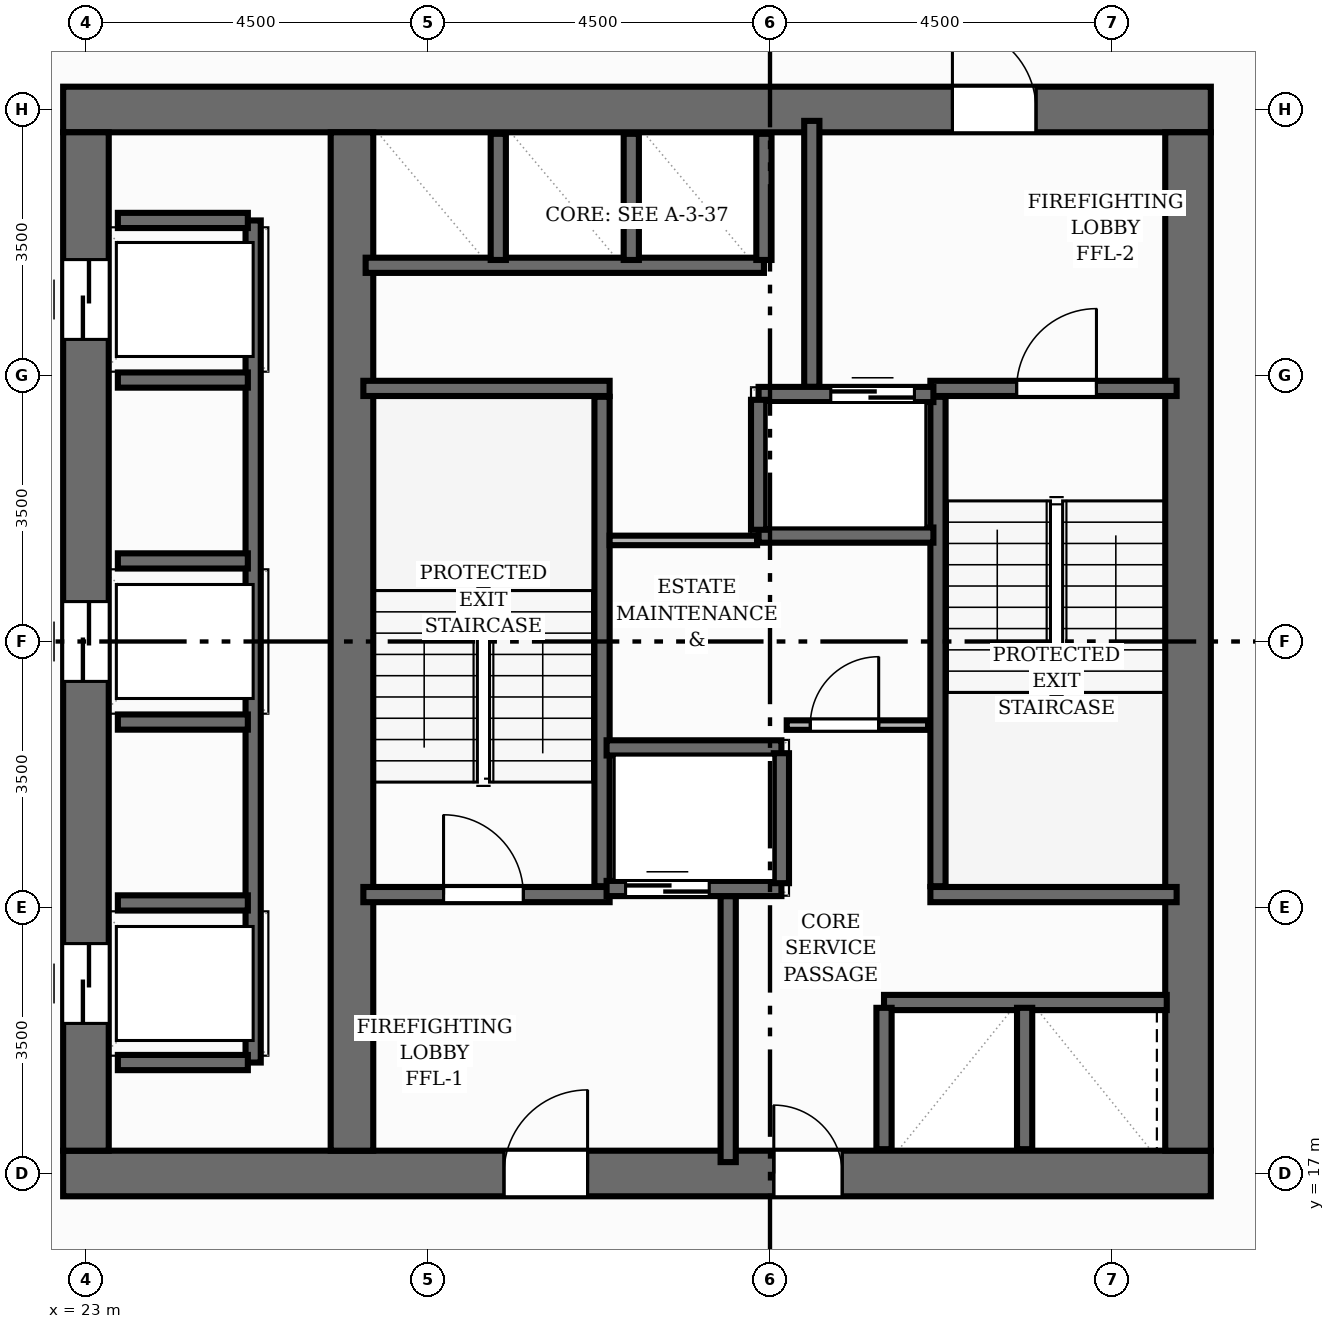
"""IFC4 building model, lengths in metres.
Left out: names, types, materials, properties, quantities, classifications, styles, units other than length and angle.
Written with IfcOpenShell. Run it as: python <this file> out.ifc"""

import sys

from ifc_helpers import new_model, si_unit, direction, frame, frame_2d, origin, place, context, subcontext, project, spatial, rectangle, extrude, element, fill, save


model = new_model("IFC4")
c1 = context("Model", 3, precision=1e-05, world=origin(), true_north=direction((0.0, 1.0)))
c2 = subcontext(c1, "Body", "Model", "MODEL_VIEW")
j1 = project(units=[si_unit("LENGTHUNIT", "METRE"), si_unit("PLANEANGLEUNIT", "RADIAN")], contexts=[c1])
p1 = place(None, origin())
s1 = spatial("IfcSite", under=j1, at=p1, CompositionType="ELEMENT")
p2 = place(p1, origin())
s2 = spatial("IfcBuilding", under=s1, at=p2, CompositionType="ELEMENT")
p3 = place(p2, frame((0.0, 0.0, 152.16)))
s3 = spatial("IfcBuildingStorey", under=s2, at=p3, CompositionType="ELEMENT", Elevation=152.16)
p4 = place(p3, frame((22.7, 17.0, 0.0), z_axis=(0.0, 0.0, 1.0), x_axis=(1.0, 0.0, 0.0)))
e1 = element("IfcWall", 1, at=p4, inside=s3, PredefinedType="SHEAR", context=c2, shape_type="SweptSolid", body=[
    extrude(rectangle(XDim=15.1, YDim=0.6, at=frame_2d((7.55, 0.0))), origin(), (0.0, 0.0, 1.0), 3.2),
])
p5 = place(p4, frame((5.8, 0.0, 0.0)))
e2 = element("IfcOpeningElement", 2, at=p5, cuts=e1, PredefinedType="OPENING", context=c2, shape_type="SweptSolid", body=[
    extrude(rectangle(XDim=1.1, YDim=2.15, at=frame_2d((0.55, 1.075))), frame((0.0, 0.31, 0.0), z_axis=(0.0, -1.0, 0.0), x_axis=(1.0, 0.0, 0.0)), (0.0, 0.0, 1.0), 0.62),
])
p6 = place(p4, frame((9.35, 0.0, 0.0)))
e3 = element("IfcOpeningElement", 3, at=p6, cuts=e1, PredefinedType="OPENING", context=c2, shape_type="SweptSolid", body=[
    extrude(rectangle(XDim=0.9, YDim=2.1, at=frame_2d((0.45, 1.05))), frame((0.0, 0.31, 0.0), z_axis=(0.0, -1.0, 0.0), x_axis=(1.0, 0.0, 0.0)), (0.0, 0.0, 1.0), 0.62),
])
p7 = place(p3, frame((22.7, 31.0, 0.0), z_axis=(0.0, 0.0, 1.0), x_axis=(1.0, 0.0, 0.0)))
e4 = element("IfcWall", 4, at=p7, inside=s3, PredefinedType="SHEAR", context=c2, shape_type="SweptSolid", body=[
    extrude(rectangle(XDim=15.1, YDim=0.6, at=frame_2d((7.55, 0.0))), origin(), (0.0, 0.0, 1.0), 3.2),
])
p8 = place(p7, frame((11.7, 0.0, 0.0)))
e5 = element("IfcOpeningElement", 5, at=p8, cuts=e4, PredefinedType="OPENING", context=c2, shape_type="SweptSolid", body=[
    extrude(rectangle(XDim=1.1, YDim=2.15, at=frame_2d((0.55, 1.075))), frame((0.0, 0.31, 0.0), z_axis=(0.0, -1.0, 0.0), x_axis=(1.0, 0.0, 0.0)), (0.0, 0.0, 1.0), 0.62),
])
p9 = place(p3, frame((23.0, 17.3, 0.0), z_axis=(0.0, 0.0, 1.0), x_axis=(0.0, 1.0, 0.0)))
e6 = element("IfcWall", 6, at=p9, inside=s3, PredefinedType="SHEAR", context=c2, shape_type="SweptSolid", body=[
    extrude(rectangle(XDim=13.4, YDim=0.6, at=frame_2d((6.7, 0.0))), origin(), (0.0, 0.0, 1.0), 3.2),
])
p10 = place(p9, frame((1.675, 0.0, 0.0)))
e7 = element("IfcOpeningElement", 7, at=p10, cuts=e6, PredefinedType="OPENING", context=c2, shape_type="SweptSolid", body=[
    extrude(rectangle(XDim=1.05, YDim=2.15, at=frame_2d((0.525, 1.075))), frame((0.0, 0.31, 0.0), z_axis=(0.0, -1.0, 0.0), x_axis=(1.0, 0.0, 0.0)), (0.0, 0.0, 1.0), 0.62),
])
p11 = place(p9, frame((6.175, 0.0, 0.0)))
e8 = element("IfcOpeningElement", 8, at=p11, cuts=e6, PredefinedType="OPENING", context=c2, shape_type="SweptSolid", body=[
    extrude(rectangle(XDim=1.05, YDim=2.15, at=frame_2d((0.525, 1.075))), frame((0.0, 0.31, 0.0), z_axis=(0.0, -1.0, 0.0), x_axis=(1.0, 0.0, 0.0)), (0.0, 0.0, 1.0), 0.62),
])
p12 = place(p9, frame((10.675, 0.0, 0.0)))
e9 = element("IfcOpeningElement", 9, at=p12, cuts=e6, PredefinedType="OPENING", context=c2, shape_type="SweptSolid", body=[
    extrude(rectangle(XDim=1.05, YDim=2.15, at=frame_2d((0.525, 1.075))), frame((0.0, 0.31, 0.0), z_axis=(0.0, -1.0, 0.0), x_axis=(1.0, 0.0, 0.0)), (0.0, 0.0, 1.0), 0.62),
])
p13 = place(p3, frame((37.5, 17.3, 0.0), z_axis=(0.0, 0.0, 1.0), x_axis=(0.0, 1.0, 0.0)))
e10 = element("IfcWall", 10, at=p13, inside=s3, PredefinedType="SHEAR", context=c2, shape_type="SweptSolid", body=[
    extrude(rectangle(XDim=13.4, YDim=0.6, at=frame_2d((6.7, 0.0))), origin(), (0.0, 0.0, 1.0), 3.2),
])
p14 = place(p3, frame((26.5, 17.3, 0.0), z_axis=(0.0, 0.0, 1.0), x_axis=(0.0, 1.0, 0.0)))
e11 = element("IfcWall", 11, at=p14, inside=s3, PredefinedType="SHEAR", context=c2, shape_type="SweptSolid", body=[
    extrude(rectangle(XDim=13.4, YDim=0.56, at=frame_2d((6.7, 0.0))), origin(), (0.0, 0.0, 1.0), 3.2),
])
p15 = place(p3, frame((29.79, 20.78, 0.0), z_axis=(0.0, 0.0, 1.0), x_axis=(0.0, 1.0, 0.0)))
e12 = element("IfcWall", 12, at=p15, inside=s3, PredefinedType="SHEAR", context=c2, shape_type="SweptSolid", body=[
    extrude(rectangle(XDim=6.44, YDim=0.2, at=frame_2d((3.22, 0.0))), origin(), (0.0, 0.0, 1.0), 3.2),
])
p16 = place(p3, frame((26.65, 27.33, 0.0), z_axis=(0.0, 0.0, 1.0), x_axis=(1.0, 0.0, 0.0)))
e13 = element("IfcWall", 13, at=p16, inside=s3, PredefinedType="SHEAR", context=c2, shape_type="SweptSolid", body=[
    extrude(rectangle(XDim=3.24, YDim=0.2, at=frame_2d((1.62, 0.0))), origin(), (0.0, 0.0, 1.0), 3.2),
])
p17 = place(p3, frame((26.65, 20.67, 0.0), z_axis=(0.0, 0.0, 1.0), x_axis=(1.0, 0.0, 0.0)))
e14 = element("IfcWall", 14, at=p17, inside=s3, PredefinedType="SHEAR", context=c2, shape_type="SweptSolid", body=[
    extrude(rectangle(XDim=3.24, YDim=0.2, at=frame_2d((1.62, 0.0))), origin(), (0.0, 0.0, 1.0), 3.2),
])
p18 = place(p17, frame((1.055, 0.0, 0.0)))
e15 = element("IfcOpeningElement", 15, at=p18, cuts=e14, PredefinedType="OPENING", context=c2, shape_type="SweptSolid", body=[
    extrude(rectangle(XDim=1.05, YDim=2.15, at=frame_2d((0.525, 1.075))), frame((0.0, 0.11, 0.0), z_axis=(0.0, -1.0, 0.0), x_axis=(1.0, 0.0, 0.0)), (0.0, 0.0, 1.0), 0.22),
])
p19 = place(p3, frame((34.21, 20.78, 0.0), z_axis=(0.0, 0.0, 1.0), x_axis=(0.0, 1.0, 0.0)))
e16 = element("IfcWall", 16, at=p19, inside=s3, PredefinedType="SHEAR", context=c2, shape_type="SweptSolid", body=[
    extrude(rectangle(XDim=6.44, YDim=0.2, at=frame_2d((3.22, 0.0))), origin(), (0.0, 0.0, 1.0), 3.2),
])
p20 = place(p3, frame((34.11, 20.67, 0.0), z_axis=(0.0, 0.0, 1.0), x_axis=(1.0, 0.0, 0.0)))
e17 = element("IfcWall", 17, at=p20, inside=s3, PredefinedType="SHEAR", context=c2, shape_type="SweptSolid", body=[
    extrude(rectangle(XDim=3.24, YDim=0.2, at=frame_2d((1.62, 0.0))), origin(), (0.0, 0.0, 1.0), 3.2),
])
p21 = place(p3, frame((34.11, 27.33, 0.0), z_axis=(0.0, 0.0, 1.0), x_axis=(1.0, 0.0, 0.0)))
e18 = element("IfcWall", 18, at=p21, inside=s3, PredefinedType="SHEAR", context=c2, shape_type="SweptSolid", body=[
    extrude(rectangle(XDim=3.24, YDim=0.2, at=frame_2d((1.62, 0.0))), origin(), (0.0, 0.0, 1.0), 3.2),
])
p22 = place(p21, frame((1.135, 0.0, 0.0)))
e19 = element("IfcOpeningElement", 19, at=p22, cuts=e18, PredefinedType="OPENING", context=c2, shape_type="SweptSolid", body=[
    extrude(rectangle(XDim=1.05, YDim=2.15, at=frame_2d((0.525, 1.075))), frame((0.0, 0.11, 0.0), z_axis=(0.0, -1.0, 0.0), x_axis=(1.0, 0.0, 0.0)), (0.0, 0.0, 1.0), 0.22),
])
for number, where, z_axis, x_axis in (
    (20, (31.45, 17.15, 0.0), (0.0, 0.0, 1.0), (0.0, 1.0, 0.0)),
    (21, (32.55, 27.35, 0.0), (0.0, 0.0, 1.0), (0.0, 1.0, 0.0)),
):
    element("IfcWall", number, at=place(p3, frame(where, z_axis=z_axis, x_axis=x_axis)), inside=s3, PredefinedType="SHEAR", context=c2, shape_type="SweptSolid", body=[
        extrude(rectangle(XDim=3.5, YDim=0.2, at=frame_2d((1.75, 0.0))), origin(), (0.0, 0.0, 1.0), 3.2),
    ])
p23 = place(p3, frame((29.85, 20.75, 0.0), z_axis=(0.0, 0.0, 1.0), x_axis=(1.0, 0.0, 0.0)))
e22 = element("IfcWall", 22, at=p23, inside=s3, PredefinedType="SHEAR", context=c2, shape_type="SweptSolid", body=[
    extrude(rectangle(XDim=2.3, YDim=0.2, at=frame_2d((1.15, 0.0))), origin(), (0.0, 0.0, 1.0), 3.2),
])
p24 = place(p23, frame((0.25, 0.0, 0.0)))
e23 = element("IfcOpeningElement", 23, at=p24, cuts=e22, PredefinedType="OPENING", context=c2, shape_type="SweptSolid", body=[
    extrude(rectangle(XDim=1.1, YDim=2.15, at=frame_2d((0.55, 1.075))), frame((0.0, 0.11, 0.0), z_axis=(0.0, -1.0, 0.0), x_axis=(1.0, 0.0, 0.0)), (0.0, 0.0, 1.0), 0.22),
])
p25 = place(p3, frame((29.85, 22.6, 0.0), z_axis=(0.0, 0.0, 1.0), x_axis=(1.0, 0.0, 0.0)))
e24 = element("IfcWall", 24, at=p25, inside=s3, PredefinedType="SHEAR", context=c2, shape_type="SweptSolid", body=[
    extrude(rectangle(XDim=2.3, YDim=0.2, at=frame_2d((1.15, 0.0))), origin(), (0.0, 0.0, 1.0), 3.2),
])
p26 = place(p3, frame((32.15, 20.82, 0.0), z_axis=(0.0, 0.0, 1.0), x_axis=(0.0, 1.0, 0.0)))
e25 = element("IfcWall", 25, at=p26, inside=s3, PredefinedType="SHEAR", context=c2, shape_type="SweptSolid", body=[
    extrude(rectangle(XDim=1.71, YDim=0.2, at=frame_2d((0.855, 0.0))), origin(), (0.0, 0.0, 1.0), 3.2),
])
p27 = place(p3, frame((31.85, 27.25, 0.0), z_axis=(0.0, 0.0, 1.0), x_axis=(1.0, 0.0, 0.0)))
e26 = element("IfcWall", 26, at=p27, inside=s3, PredefinedType="SHEAR", context=c2, shape_type="SweptSolid", body=[
    extrude(rectangle(XDim=2.3, YDim=0.2, at=frame_2d((1.15, 0.0))), origin(), (0.0, 0.0, 1.0), 3.2),
])
p28 = place(p27, frame((0.95, 0.0, 0.0)))
e27 = element("IfcOpeningElement", 27, at=p28, cuts=e26, PredefinedType="OPENING", context=c2, shape_type="SweptSolid", body=[
    extrude(rectangle(XDim=1.1, YDim=2.15, at=frame_2d((0.55, 1.075))), frame((0.0, 0.11, 0.0), z_axis=(0.0, -1.0, 0.0), x_axis=(1.0, 0.0, 0.0)), (0.0, 0.0, 1.0), 0.22),
])
p29 = place(p3, frame((31.85, 25.4, 0.0), z_axis=(0.0, 0.0, 1.0), x_axis=(1.0, 0.0, 0.0)))
e28 = element("IfcWall", 28, at=p29, inside=s3, PredefinedType="SHEAR", context=c2, shape_type="SweptSolid", body=[
    extrude(rectangle(XDim=2.3, YDim=0.2, at=frame_2d((1.15, 0.0))), origin(), (0.0, 0.0, 1.0), 3.2),
])
p30 = place(p3, frame((31.85, 25.47, 0.0), z_axis=(0.0, 0.0, 1.0), x_axis=(0.0, 1.0, 0.0)))
e29 = element("IfcWall", 29, at=p30, inside=s3, PredefinedType="SHEAR", context=c2, shape_type="SweptSolid", body=[
    extrude(rectangle(XDim=1.71, YDim=0.2, at=frame_2d((0.855, 0.0))), origin(), (0.0, 0.0, 1.0), 3.2),
])
p31 = place(p3, frame((25.2, 18.46, 0.0), z_axis=(0.0, 0.0, 1.0), x_axis=(0.0, 1.0, 0.0)))
e30 = element("IfcWall", 30, at=p31, inside=s3, PredefinedType="SHEAR", context=c2, shape_type="SweptSolid", body=[
    extrude(rectangle(XDim=11.08, YDim=0.2, at=frame_2d((5.54, 0.0))), origin(), (0.0, 0.0, 1.0), 3.2),
])
for number, where, z_axis, x_axis in (
    (31, (23.42, 18.46, 0.0), (0.0, 0.0, 1.0), (1.0, 0.0, 0.0)),
    (32, (23.42, 29.54, 0.0), (0.0, 0.0, 1.0), (1.0, 0.0, 0.0)),
    (33, (23.42, 20.56, 0.0), (0.0, 0.0, 1.0), (1.0, 0.0, 0.0)),
    (34, (23.42, 22.94, 0.0), (0.0, 0.0, 1.0), (1.0, 0.0, 0.0)),
    (35, (23.42, 25.06, 0.0), (0.0, 0.0, 1.0), (1.0, 0.0, 0.0)),
    (36, (23.42, 27.44, 0.0), (0.0, 0.0, 1.0), (1.0, 0.0, 0.0)),
):
    element("IfcWall", number, at=place(p3, frame(where, z_axis=z_axis, x_axis=x_axis)), inside=s3, PredefinedType="SHEAR", context=c2, shape_type="SweptSolid", body=[
        extrude(rectangle(XDim=1.71, YDim=0.2, at=frame_2d((0.855, 0.0))), origin(), (0.0, 0.0, 1.0), 3.2),
    ])
p32 = place(p3, frame((26.68, 28.95, 0.0), z_axis=(0.0, 0.0, 1.0), x_axis=(1.0, 0.0, 0.0)))
e37 = element("IfcWall", 37, at=p32, inside=s3, PredefinedType="SHEAR", context=c2, shape_type="SweptSolid", body=[
    extrude(rectangle(XDim=5.24, YDim=0.2, at=frame_2d((2.62, 0.0))), origin(), (0.0, 0.0, 1.0), 3.2),
])
for number, where, z_axis, x_axis in (
    (38, (31.92, 29.02, 0.0), (0.0, 0.0, 1.0), (0.0, 1.0, 0.0)),
    (39, (28.425, 29.02, 0.0), (0.0, 0.0, 1.0), (0.0, 1.0, 0.0)),
    (40, (30.175, 29.02, 0.0), (0.0, 0.0, 1.0), (0.0, 1.0, 0.0)),
):
    element("IfcWall", number, at=place(p3, frame(where, z_axis=z_axis, x_axis=x_axis)), inside=s3, PredefinedType="SHEAR", context=c2, shape_type="SweptSolid", body=[
        extrude(rectangle(XDim=1.66, YDim=0.2, at=frame_2d((0.83, 0.0))), origin(), (0.0, 0.0, 1.0), 3.2),
    ])
p33 = place(p3, frame((33.5, 19.25, 0.0), z_axis=(0.0, 0.0, 1.0), x_axis=(1.0, 0.0, 0.0)))
e41 = element("IfcWall", 41, at=p33, inside=s3, PredefinedType="SHEAR", context=c2, shape_type="SweptSolid", body=[
    extrude(rectangle(XDim=3.72, YDim=0.2, at=frame_2d((1.86, 0.0))), origin(), (0.0, 0.0, 1.0), 3.2),
])
for number, where, z_axis, x_axis in (
    (42, (33.5, 17.32, 0.0), (0.0, 0.0, 1.0), (0.0, 1.0, 0.0)),
    (43, (35.35, 17.32, 0.0), (0.0, 0.0, 1.0), (0.0, 1.0, 0.0)),
):
    element("IfcWall", number, at=place(p3, frame(where, z_axis=z_axis, x_axis=x_axis)), inside=s3, PredefinedType="SHEAR", context=c2, shape_type="SweptSolid", body=[
        extrude(rectangle(XDim=1.86, YDim=0.2, at=frame_2d((0.93, 0.0))), origin(), (0.0, 0.0, 1.0), 3.2),
    ])
p34 = place(p3, frame((32.22, 22.9, 0.0), z_axis=(0.0, 0.0, 1.0), x_axis=(1.0, 0.0, 0.0)))
e44 = element("IfcWall", 44, at=p34, inside=s3, PredefinedType="PARTITIONING", context=c2, shape_type="SweptSolid", body=[
    extrude(rectangle(XDim=1.86, YDim=0.125, at=frame_2d((0.93, 0.0))), origin(), (0.0, 0.0, 1.0), 2.955),
])
p35 = place(p34, frame((0.31, 0.0, 0.0)))
e45 = element("IfcOpeningElement", 45, at=p35, cuts=e44, PredefinedType="OPENING", context=c2, shape_type="SweptSolid", body=[
    extrude(rectangle(XDim=0.9, YDim=2.1, at=frame_2d((0.45, 1.05))), frame((0.0, 0.073, 0.0), z_axis=(0.0, -1.0, 0.0), x_axis=(1.0, 0.0, 0.0)), (0.0, 0.0, 1.0), 0.145),
])
p36 = place(p3, frame((29.89, 25.33, 0.0), z_axis=(0.0, 0.0, 1.0), x_axis=(1.0, 0.0, 0.0)))
e46 = element("IfcWall", 46, at=p36, inside=s3, PredefinedType="PARTITIONING", context=c2, shape_type="SweptSolid", body=[
    extrude(rectangle(XDim=1.94, YDim=0.125, at=frame_2d((0.97, 0.0))), origin(), (0.0, 0.0, 1.0), 2.955),
])
p37 = place(p3, frame((44.336, 20.497, 0.0), z_axis=(0.0, 0.0, 1.0), x_axis=(-0.696857448942, -0.717209659621, 0.0)))
e47 = element("IfcWall", 47, at=p37, inside=s3, PredefinedType="PARTITIONING", context=c2, shape_type="SweptSolid", body=[
    extrude(rectangle(XDim=13.052, YDim=0.125, at=frame_2d((6.526, 0.0))), origin(), (0.0, 0.0, 1.0), 2.411),
])
p38 = place(p37, frame((5.516, 0.0, 0.0)))
e48 = element("IfcOpeningElement", 48, at=p38, cuts=e47, PredefinedType="OPENING", context=c2, shape_type="SweptSolid", body=[
    extrude(rectangle(XDim=0.9, YDim=2.1, at=frame_2d((0.45, 1.05))), frame((0.0, 0.073, 0.0), z_axis=(0.0, -1.0, 0.0), x_axis=(1.0, 0.0, 0.0)), (0.0, 0.0, 1.0), 0.145),
])
p39 = place(p18, origin())
e49 = element("IfcDoor", 49, at=p39, inside=s3, OperationType="SINGLE_SWING_LEFT", PredefinedType="DOOR", context=c2, shape_type="SweptSolid", body=[
    extrude(rectangle(XDim=1.05, YDim=2.15, at=frame_2d((0.525, 1.075))), frame((0.0, 0.025, 0.0), z_axis=(0.0, -1.0, 0.0), x_axis=(1.0, 0.0, 0.0)), (0.0, 0.0, 1.0), 0.05),
])
fill(e15, e49)
p40 = place(p22, origin())
e50 = element("IfcDoor", 50, at=p40, inside=s3, OperationType="SINGLE_SWING_RIGHT", PredefinedType="DOOR", context=c2, shape_type="SweptSolid", body=[
    extrude(rectangle(XDim=1.05, YDim=2.15, at=frame_2d((0.525, 1.075))), frame((0.0, 0.025, 0.0), z_axis=(0.0, -1.0, 0.0), x_axis=(1.0, 0.0, 0.0)), (0.0, 0.0, 1.0), 0.05),
])
fill(e19, e50)
p41 = place(p5, origin())
e51 = element("IfcDoor", 51, at=p41, inside=s3, OperationType="SINGLE_SWING_RIGHT", PredefinedType="DOOR", context=c2, shape_type="SweptSolid", body=[
    extrude(rectangle(XDim=1.1, YDim=2.15, at=frame_2d((0.55, 1.075))), frame((0.0, 0.025, 0.0), z_axis=(0.0, -1.0, 0.0), x_axis=(1.0, 0.0, 0.0)), (0.0, 0.0, 1.0), 0.05),
])
fill(e2, e51)
p42 = place(p8, origin())
e52 = element("IfcDoor", 52, at=p42, inside=s3, OperationType="SINGLE_SWING_LEFT", PredefinedType="DOOR", context=c2, shape_type="SweptSolid", body=[
    extrude(rectangle(XDim=1.1, YDim=2.15, at=frame_2d((0.55, 1.075))), frame((0.0, 0.025, 0.0), z_axis=(0.0, -1.0, 0.0), x_axis=(1.0, 0.0, 0.0)), (0.0, 0.0, 1.0), 0.05),
])
fill(e5, e52)
p43 = place(p24, origin())
e53 = element("IfcDoor", 53, at=p43, inside=s3, OperationType="DOUBLE_DOOR_SLIDING", PredefinedType="DOOR", context=c2, shape_type="SweptSolid", body=[
    extrude(rectangle(XDim=1.1, YDim=2.15, at=frame_2d((0.55, 1.075))), frame((0.0, 0.025, 0.0), z_axis=(0.0, -1.0, 0.0), x_axis=(1.0, 0.0, 0.0)), (0.0, 0.0, 1.0), 0.05),
])
fill(e23, e53)
p44 = place(p28, origin())
e54 = element("IfcDoor", 54, at=p44, inside=s3, OperationType="DOUBLE_DOOR_SLIDING", PredefinedType="DOOR", context=c2, shape_type="SweptSolid", body=[
    extrude(rectangle(XDim=1.1, YDim=2.15, at=frame_2d((0.55, 1.075))), frame((0.0, 0.025, 0.0), z_axis=(0.0, -1.0, 0.0), x_axis=(1.0, 0.0, 0.0)), (0.0, 0.0, 1.0), 0.05),
])
fill(e27, e54)
p45 = place(p10, origin())
e55 = element("IfcDoor", 55, at=p45, inside=s3, OperationType="DOUBLE_DOOR_SLIDING", PredefinedType="DOOR", context=c2, shape_type="SweptSolid", body=[
    extrude(rectangle(XDim=1.05, YDim=2.15, at=frame_2d((0.525, 1.075))), frame((0.0, 0.025, 0.0), z_axis=(0.0, -1.0, 0.0), x_axis=(1.0, 0.0, 0.0)), (0.0, 0.0, 1.0), 0.05),
])
fill(e7, e55)
p46 = place(p11, origin())
e56 = element("IfcDoor", 56, at=p46, inside=s3, OperationType="DOUBLE_DOOR_SLIDING", PredefinedType="DOOR", context=c2, shape_type="SweptSolid", body=[
    extrude(rectangle(XDim=1.05, YDim=2.15, at=frame_2d((0.525, 1.075))), frame((0.0, 0.025, 0.0), z_axis=(0.0, -1.0, 0.0), x_axis=(1.0, 0.0, 0.0)), (0.0, 0.0, 1.0), 0.05),
])
fill(e8, e56)
p47 = place(p12, origin())
e57 = element("IfcDoor", 57, at=p47, inside=s3, OperationType="DOUBLE_DOOR_SLIDING", PredefinedType="DOOR", context=c2, shape_type="SweptSolid", body=[
    extrude(rectangle(XDim=1.05, YDim=2.15, at=frame_2d((0.525, 1.075))), frame((0.0, 0.025, 0.0), z_axis=(0.0, -1.0, 0.0), x_axis=(1.0, 0.0, 0.0)), (0.0, 0.0, 1.0), 0.05),
])
fill(e9, e57)
p48 = place(p6, origin())
e58 = element("IfcDoor", 58, at=p48, inside=s3, OperationType="SINGLE_SWING_LEFT", PredefinedType="DOOR", context=c2, shape_type="SweptSolid", body=[
    extrude(rectangle(XDim=0.9, YDim=2.1, at=frame_2d((0.45, 1.05))), frame((0.0, 0.025, 0.0), z_axis=(0.0, -1.0, 0.0), x_axis=(1.0, 0.0, 0.0)), (0.0, 0.0, 1.0), 0.05),
])
fill(e3, e58)
p49 = place(p35, origin())
e59 = element("IfcDoor", 59, at=p49, inside=s3, OperationType="SINGLE_SWING_RIGHT", PredefinedType="DOOR", context=c2, shape_type="SweptSolid", body=[
    extrude(rectangle(XDim=0.9, YDim=2.1, at=frame_2d((0.45, 1.05))), frame((0.0, 0.025, 0.0), z_axis=(0.0, -1.0, 0.0), x_axis=(1.0, 0.0, 0.0)), (0.0, 0.0, 1.0), 0.05),
])
fill(e45, e59)
save(model, sys.argv[1])
